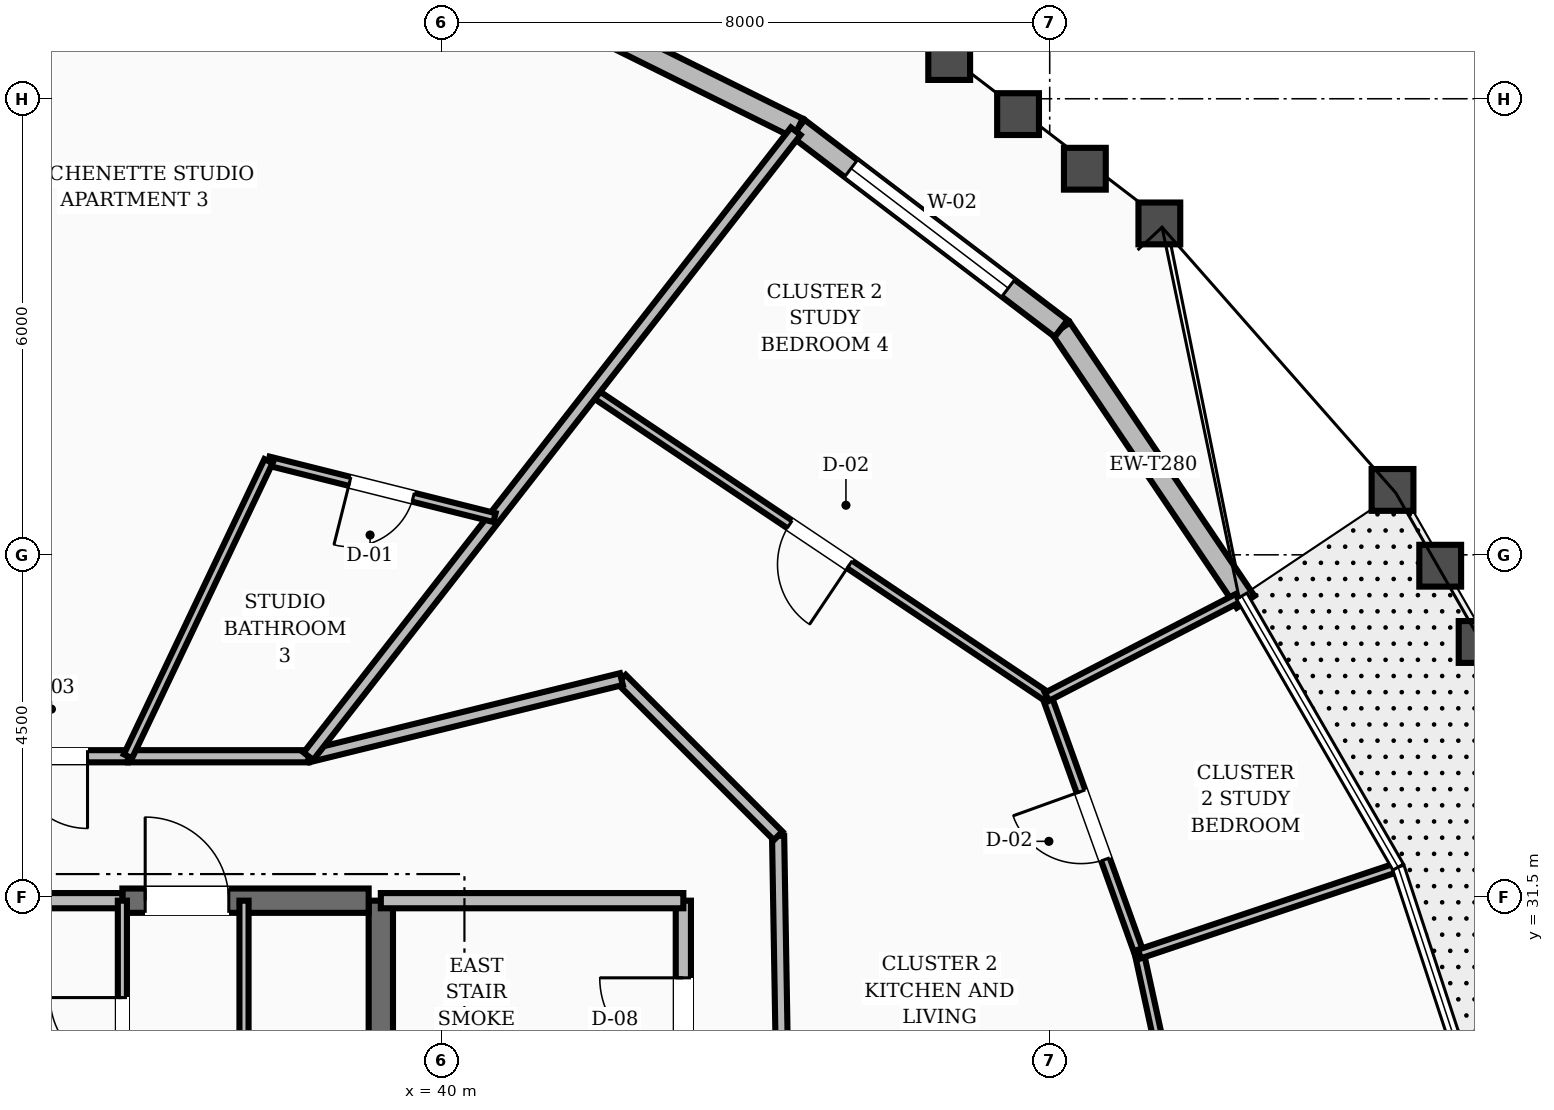
"""IFC4 building model, lengths in metres.
Left out: names, types, materials, properties, quantities, classifications, styles, units other than length and angle.
Written with IfcOpenShell. Run it as: python <this file> out.ifc"""

import sys

from ifc_helpers import new_model, si_unit, direction, frame, frame_2d, origin, place, context, subcontext, project, spatial, rectangle, extrude, element, fill, save


model = new_model("IFC4")
c1 = context("Model", 3, precision=1e-05, world=origin(), true_north=direction((0.0, 1.0)))
c2 = subcontext(c1, "Body", "Model", "MODEL_VIEW")
j1 = project(units=[si_unit("LENGTHUNIT", "METRE"), si_unit("PLANEANGLEUNIT", "RADIAN")], contexts=[c1])
p1 = place(None, origin())
s1 = spatial("IfcSite", under=j1, at=p1, CompositionType="ELEMENT")
p2 = place(p1, origin())
s2 = spatial("IfcBuilding", under=s1, at=p2, CompositionType="ELEMENT")
p3 = place(p2, frame((0.0, 0.0, 225.6)))
s3 = spatial("IfcBuildingStorey", under=s2, at=p3, CompositionType="ELEMENT", Elevation=225.6)
p4 = place(p3, frame((39.2, 25.15, 0.0), z_axis=(0.0, 0.0, 1.0), x_axis=(0.0, 1.0, 0.0)))
e1 = element("IfcWall", 1, at=p4, inside=s3, PredefinedType="SHEAR", context=c2, shape_type="SweptSolid", body=[
    extrude(rectangle(XDim=6.3, YDim=0.32, at=frame_2d((3.15, 0.0))), origin(), (0.0, 0.0, 1.0), 3.6),
])
p5 = place(p3, frame((35.8, 31.45, 0.0), z_axis=(0.0, 0.0, 1.0), x_axis=(1.0, 0.0, 0.0)))
e2 = element("IfcWall", 2, at=p5, inside=s3, PredefinedType="SHEAR", context=c2, shape_type="SweptSolid", body=[
    extrude(rectangle(XDim=3.24, YDim=0.32, at=frame_2d((1.62, 0.0))), origin(), (0.0, 0.0, 1.0), 3.6),
])
p6 = place(p5, frame((0.3, 0.0, 0.0)))
e3 = element("IfcOpeningElement", 3, at=p6, cuts=e2, PredefinedType="OPENING", context=c2, shape_type="SweptSolid", body=[
    extrude(rectangle(XDim=1.1, YDim=2.1, at=frame_2d((0.55, 1.05))), frame((0.0, 0.17, 0.0), z_axis=(0.0, -1.0, 0.0), x_axis=(1.0, 0.0, 0.0)), (0.0, 0.0, 1.0), 0.34),
])
p7 = place(p3, frame((50.577, 35.381, 0.0), z_axis=(0.0, 0.0, 1.0), x_axis=(-0.559158756737, 0.829060603795, 0.0)))
e4 = element("IfcWall", 4, at=p7, inside=s3, PredefinedType="STANDARD", context=c2, shape_type="SweptSolid", body=[
    extrude(rectangle(XDim=4.339, YDim=0.28, at=frame_2d((2.169, 0.0))), origin(), (0.0, 0.0, 1.0), 2.88),
])
p8 = place(p3, frame((48.151, 38.978, 0.0), z_axis=(0.0, 0.0, 1.0), x_axis=(-0.795722836513, 0.605660934394, 0.0)))
e5 = element("IfcWall", 5, at=p8, inside=s3, PredefinedType="STANDARD", context=c2, shape_type="SweptSolid", body=[
    extrude(rectangle(XDim=4.349, YDim=0.28, at=frame_2d((2.175, 0.0))), origin(), (0.0, 0.0, 1.0), 2.88),
])
p9 = place(p8, frame((0.875, 0.0, 0.8)))
e6 = element("IfcOpeningElement", 6, at=p9, cuts=e5, PredefinedType="OPENING", context=c2, shape_type="SweptSolid", body=[
    extrude(rectangle(XDim=2.6, YDim=1.65, at=frame_2d((1.3, 0.825))), frame((0.0, 0.15, 0.0), z_axis=(0.0, -1.0, 0.0), x_axis=(1.0, 0.0, 0.0)), (0.0, 0.0, 1.0), 0.3),
])
p10 = place(p3, frame((44.69, 41.613, 0.0), z_axis=(0.0, 0.0, 1.0), x_axis=(-0.89596177971, 0.44413116227, 0.0)))
e7 = element("IfcWall", 7, at=p10, inside=s3, PredefinedType="STANDARD", context=c2, shape_type="SweptSolid", body=[
    extrude(rectangle(XDim=4.407, YDim=0.28, at=frame_2d((2.204, 0.0))), origin(), (0.0, 0.0, 1.0), 2.88),
])
p11 = place(p3, frame((43.18, 28.32, 0.0), z_axis=(0.0, 0.0, 1.0), x_axis=(0.0, 1.0, 0.0)))
e8 = element("IfcWall", 8, at=p11, inside=s3, PredefinedType="SOLIDWALL", context=c2, shape_type="SweptSolid", body=[
    extrude(rectangle(XDim=3.13, YDim=0.2, at=frame_2d((1.565, 0.0))), origin(), (0.0, 0.0, 1.0), 2.87),
])
p12 = place(p11, frame((1.015, 0.0, 0.0)))
e9 = element("IfcOpeningElement", 9, at=p12, cuts=e8, PredefinedType="OPENING", context=c2, shape_type="SweptSolid", body=[
    extrude(rectangle(XDim=1.1, YDim=2.1, at=frame_2d((0.55, 1.05))), frame((0.0, 0.11, 0.0), z_axis=(0.0, -1.0, 0.0), x_axis=(1.0, 0.0, 0.0)), (0.0, 0.0, 1.0), 0.22),
])
p13 = place(p3, frame((39.2, 31.45, 0.0), z_axis=(0.0, 0.0, 1.0), x_axis=(1.0, 0.0, 0.0)))
e10 = element("IfcWall", 10, at=p13, inside=s3, PredefinedType="SOLIDWALL", context=c2, shape_type="SweptSolid", body=[
    extrude(rectangle(XDim=3.98, YDim=0.2, at=frame_2d((1.99, 0.0))), origin(), (0.0, 0.0, 1.0), 2.87),
])
p14 = place(p3, frame((28.2, 31.45, 0.0), z_axis=(0.0, 0.0, 1.0), x_axis=(1.0, 0.0, 0.0)))
e11 = element("IfcWall", 11, at=p14, inside=s3, PredefinedType="SOLIDWALL", context=c2, shape_type="SweptSolid", body=[
    extrude(rectangle(XDim=7.6, YDim=0.2, at=frame_2d((3.8, 0.0))), origin(), (0.0, 0.0, 1.0), 2.87),
])
p15 = place(p14, frame((1.0, 0.0, 0.0)))
e12 = element("IfcOpeningElement", 12, at=p15, cuts=e11, PredefinedType="OPENING", context=c2, shape_type="SweptSolid", body=[
    extrude(rectangle(XDim=0.95, YDim=2.1, at=frame_2d((0.475, 1.05))), frame((0.0, 0.11, 0.0), z_axis=(0.0, -1.0, 0.0), x_axis=(1.0, 0.0, 0.0)), (0.0, 0.0, 1.0), 0.22),
])
p16 = place(p3, frame((35.8, 27.95, 0.0), z_axis=(0.0, 0.0, 1.0), x_axis=(0.0, 1.0, 0.0)))
e13 = element("IfcWall", 13, at=p16, inside=s3, PredefinedType="PARTITIONING", context=c2, shape_type="SweptSolid", body=[
    extrude(rectangle(XDim=3.5, YDim=0.12, at=frame_2d((1.75, 0.0))), origin(), (0.0, 0.0, 1.0), 2.87),
])
p17 = place(p16, frame((1.275, 0.0, 0.0)))
e14 = element("IfcOpeningElement", 14, at=p17, cuts=e13, PredefinedType="OPENING", context=c2, shape_type="SweptSolid", body=[
    extrude(rectangle(XDim=0.95, YDim=2.1, at=frame_2d((0.475, 1.05))), frame((0.0, 0.07, 0.0), z_axis=(0.0, -1.0, 0.0), x_axis=(1.0, 0.0, 0.0)), (0.0, 0.0, 1.0), 0.14),
])
p18 = place(p3, frame((37.4, 25.25, 0.0), z_axis=(0.0, 0.0, 1.0), x_axis=(0.0, 1.0, 0.0)))
e15 = element("IfcWall", 15, at=p18, inside=s3, PredefinedType="PARTITIONING", context=c2, shape_type="SweptSolid", body=[
    extrude(rectangle(XDim=6.2, YDim=0.12, at=frame_2d((3.1, 0.0))), origin(), (0.0, 0.0, 1.0), 2.87),
])
p19 = place(p18, frame((2.625, 0.0, 0.0)))
e16 = element("IfcOpeningElement", 16, at=p19, cuts=e15, PredefinedType="OPENING", context=c2, shape_type="SweptSolid", body=[
    extrude(rectangle(XDim=0.95, YDim=2.1, at=frame_2d((0.475, 1.05))), frame((0.0, 0.07, 0.0), z_axis=(0.0, -1.0, 0.0), x_axis=(1.0, 0.0, 0.0)), (0.0, 0.0, 1.0), 0.14),
])
p20 = place(p3, frame((44.48, 29.169, 0.0), z_axis=(0.0, 0.0, 1.0), x_axis=(-0.016981035134, 0.999855811828, 0.0)))
e17 = element("IfcWall", 17, at=p20, inside=s3, PredefinedType="SOLIDWALL", context=c2, shape_type="SweptSolid", body=[
    extrude(rectangle(XDim=3.134, YDim=0.16, at=frame_2d((1.567, 0.0))), origin(), (0.0, 0.0, 1.0), 2.87),
])
p21 = place(p3, frame((44.427, 32.303, 0.0), z_axis=(0.0, 0.0, 1.0), x_axis=(-0.707106781187, 0.707106781187, 0.0)))
e18 = element("IfcWall", 18, at=p21, inside=s3, PredefinedType="SOLIDWALL", context=c2, shape_type="SweptSolid", body=[
    extrude(rectangle(XDim=2.916, YDim=0.16, at=frame_2d((1.458, 0.0))), origin(), (0.0, 0.0, 1.0), 2.87),
])
p22 = place(p3, frame((42.365, 34.365, 0.0), z_axis=(0.0, 0.0, 1.0), x_axis=(-0.970939799552, -0.239323850978, 0.0)))
e19 = element("IfcWall", 19, at=p22, inside=s3, PredefinedType="SOLIDWALL", context=c2, shape_type="SweptSolid", body=[
    extrude(rectangle(XDim=4.241, YDim=0.16, at=frame_2d((2.12, 0.0))), origin(), (0.0, 0.0, 1.0), 2.87),
])
p23 = place(p3, frame((38.248, 33.35, 0.0), z_axis=(0.0, 0.0, 1.0), x_axis=(-1.0, 0.0, 0.0)))
e20 = element("IfcWall", 20, at=p23, inside=s3, PredefinedType="SOLIDWALL", context=c2, shape_type="SweptSolid", body=[
    extrude(rectangle(XDim=2.375, YDim=0.16, at=frame_2d((1.188, 0.0))), origin(), (0.0, 0.0, 1.0), 2.87),
])
p24 = place(p3, frame((35.873, 33.35, 0.0), z_axis=(0.0, 0.0, 1.0), x_axis=(-1.0, 0.0, 0.0)))
e21 = element("IfcWall", 21, at=p24, inside=s3, PredefinedType="SOLIDWALL", context=c2, shape_type="SweptSolid", body=[
    extrude(rectangle(XDim=2.013, YDim=0.16, at=frame_2d((1.006, 0.0))), origin(), (0.0, 0.0, 1.0), 2.87),
])
p25 = place(p24, frame((0.531, 0.0, 0.0)))
e22 = element("IfcOpeningElement", 22, at=p25, cuts=e21, PredefinedType="OPENING", context=c2, shape_type="SweptSolid", body=[
    extrude(rectangle(XDim=0.95, YDim=2.1, at=frame_2d((0.475, 1.05))), frame((0.0, 0.09, 0.0), z_axis=(0.0, -1.0, 0.0), x_axis=(1.0, 0.0, 0.0)), (0.0, 0.0, 1.0), 0.18),
])
p26 = place(p3, frame((49.916, 27.376, 0.0), z_axis=(0.0, 0.0, 1.0), x_axis=(-0.213063946471, 0.977038256525, 0.0)))
e23 = element("IfcWall", 23, at=p26, inside=s3, PredefinedType="PARTITIONING", context=c2, shape_type="SweptSolid", body=[
    extrude(rectangle(XDim=3.451, YDim=0.12, at=frame_2d((1.726, 0.0))), origin(), (0.0, 0.0, 1.0), 2.87),
])
p27 = place(p26, frame((1.251, 0.0, 0.0)))
e24 = element("IfcOpeningElement", 24, at=p27, cuts=e23, PredefinedType="OPENING", context=c2, shape_type="SweptSolid", body=[
    extrude(rectangle(XDim=0.95, YDim=2.1, at=frame_2d((0.475, 1.05))), frame((0.0, 0.07, 0.0), z_axis=(0.0, -1.0, 0.0), x_axis=(1.0, 0.0, 0.0)), (0.0, 0.0, 1.0), 0.14),
])
p28 = place(p3, frame((49.181, 30.748, 0.0), z_axis=(0.0, 0.0, 1.0), x_axis=(-0.33827951378, 0.941045679314, 0.0)))
e25 = element("IfcWall", 25, at=p28, inside=s3, PredefinedType="PARTITIONING", context=c2, shape_type="SweptSolid", body=[
    extrude(rectangle(XDim=3.596, YDim=0.12, at=frame_2d((1.798, 0.0))), origin(), (0.0, 0.0, 1.0), 2.87),
])
p29 = place(p28, frame((1.323, 0.0, 0.0)))
e26 = element("IfcOpeningElement", 26, at=p29, cuts=e25, PredefinedType="OPENING", context=c2, shape_type="SweptSolid", body=[
    extrude(rectangle(XDim=0.95, YDim=2.1, at=frame_2d((0.475, 1.05))), frame((0.0, 0.07, 0.0), z_axis=(0.0, -1.0, 0.0), x_axis=(1.0, 0.0, 0.0)), (0.0, 0.0, 1.0), 0.14),
])
p30 = place(p3, frame((49.181, 30.748, 0.0), z_axis=(0.0, 0.0, 1.0), x_axis=(0.947929060238, 0.318481548534, 0.0)))
e27 = element("IfcWall", 27, at=p30, inside=s3, PredefinedType="PARTITIONING", context=c2, shape_type="SweptSolid", body=[
    extrude(rectangle(XDim=3.541, YDim=0.12, at=frame_2d((1.771, 0.0))), origin(), (0.0, 0.0, 1.0), 2.87),
])
p31 = place(p3, frame((47.964, 34.133, 0.0), z_axis=(0.0, 0.0, 1.0), x_axis=(-0.830591967255, 0.556881481046, 0.0)))
e28 = element("IfcWall", 28, at=p31, inside=s3, PredefinedType="PARTITIONING", context=c2, shape_type="SweptSolid", body=[
    extrude(rectangle(XDim=7.2, YDim=0.12, at=frame_2d((3.6, 0.0))), origin(), (0.0, 0.0, 1.0), 2.87),
])
p32 = place(p31, frame((3.125, 0.0, 0.0)))
e29 = element("IfcOpeningElement", 29, at=p32, cuts=e28, PredefinedType="OPENING", context=c2, shape_type="SweptSolid", body=[
    extrude(rectangle(XDim=0.95, YDim=2.1, at=frame_2d((0.475, 1.05))), frame((0.0, 0.07, 0.0), z_axis=(0.0, -1.0, 0.0), x_axis=(1.0, 0.0, 0.0)), (0.0, 0.0, 1.0), 0.14),
])
p33 = place(p3, frame((47.964, 34.133, 0.0), z_axis=(0.0, 0.0, 1.0), x_axis=(0.888279464534, 0.459303377831, 0.0)))
e30 = element("IfcWall", 30, at=p33, inside=s3, PredefinedType="PARTITIONING", context=c2, shape_type="SweptSolid", body=[
    extrude(rectangle(XDim=2.834, YDim=0.12, at=frame_2d((1.417, 0.0))), origin(), (0.0, 0.0, 1.0), 2.87),
])
p34 = place(p3, frame((38.248, 33.35, 0.0), z_axis=(0.0, 0.0, 1.0), x_axis=(0.614883592215, 0.788617884672, 0.0)))
e31 = element("IfcWall", 31, at=p34, inside=s3, PredefinedType="SOLIDWALL", context=c2, shape_type="SweptSolid", body=[
    extrude(rectangle(XDim=10.427, YDim=0.16, at=frame_2d((5.213, 0.0))), origin(), (0.0, 0.0, 1.0), 2.87),
])
p35 = place(p3, frame((40.696, 36.49, 0.0), z_axis=(0.0, 0.0, 1.0), x_axis=(-0.970090929749, 0.242741813496, 0.0)))
e32 = element("IfcWall", 32, at=p35, inside=s3, PredefinedType="PARTITIONING", context=c2, shape_type="SweptSolid", body=[
    extrude(rectangle(XDim=3.064, YDim=0.12, at=frame_2d((1.532, 0.0))), origin(), (0.0, 0.0, 1.0), 2.87),
])
p36 = place(p35, frame((1.102, 0.0, 0.0)))
e33 = element("IfcOpeningElement", 33, at=p36, cuts=e32, PredefinedType="OPENING", context=c2, shape_type="SweptSolid", body=[
    extrude(rectangle(XDim=0.86, YDim=2.1, at=frame_2d((0.43, 1.05))), frame((0.0, 0.07, 0.0), z_axis=(0.0, -1.0, 0.0), x_axis=(1.0, 0.0, 0.0)), (0.0, 0.0, 1.0), 0.14),
])
p37 = place(p3, frame((35.873, 33.35, 0.0), z_axis=(0.0, 0.0, 1.0), x_axis=(0.430037122425, 0.90281120581, 0.0)))
e34 = element("IfcWall", 34, at=p37, inside=s3, PredefinedType="PARTITIONING", context=c2, shape_type="SweptSolid", body=[
    extrude(rectangle(XDim=4.302, YDim=0.12, at=frame_2d((2.151, 0.0))), origin(), (0.0, 0.0, 1.0), 2.87),
])
p38 = place(p9, origin())
e35 = element("IfcWindow", 35, at=p38, inside=s3, PartitioningType="SINGLE_PANEL", PredefinedType="WINDOW", context=c2, shape_type="SweptSolid", body=[
    extrude(rectangle(XDim=2.6, YDim=1.65, at=frame_2d((1.3, 0.825))), frame((0.0, 0.03, 0.0), z_axis=(0.0, -1.0, 0.0), x_axis=(1.0, 0.0, 0.0)), (0.0, 0.0, 1.0), 0.06),
])
fill(e6, e35)
p39 = place(p12, origin())
e36 = element("IfcDoor", 36, at=p39, inside=s3, OperationType="SINGLE_SWING_RIGHT", PredefinedType="DOOR", context=c2, shape_type="SweptSolid", body=[
    extrude(rectangle(XDim=1.1, YDim=2.1, at=frame_2d((0.55, 1.05))), frame((0.0, 0.025, 0.0), z_axis=(0.0, -1.0, 0.0), x_axis=(1.0, 0.0, 0.0)), (0.0, 0.0, 1.0), 0.05),
])
fill(e9, e36)
p40 = place(p6, origin())
e37 = element("IfcDoor", 37, at=p40, inside=s3, OperationType="SINGLE_SWING_LEFT", PredefinedType="DOOR", context=c2, shape_type="SweptSolid", body=[
    extrude(rectangle(XDim=1.1, YDim=2.1, at=frame_2d((0.55, 1.05))), frame((0.0, 0.025, 0.0), z_axis=(0.0, -1.0, 0.0), x_axis=(1.0, 0.0, 0.0)), (0.0, 0.0, 1.0), 0.05),
])
fill(e3, e37)
p41 = place(p17, origin())
e38 = element("IfcDoor", 38, at=p41, inside=s3, OperationType="SINGLE_SWING_RIGHT", PredefinedType="DOOR", context=c2, shape_type="SweptSolid", body=[
    extrude(rectangle(XDim=0.95, YDim=2.1, at=frame_2d((0.475, 1.05))), frame((0.0, 0.025, 0.0), z_axis=(0.0, -1.0, 0.0), x_axis=(1.0, 0.0, 0.0)), (0.0, 0.0, 1.0), 0.05),
])
fill(e14, e38)
p42 = place(p29, origin())
e39 = element("IfcDoor", 39, at=p42, inside=s3, OperationType="SINGLE_SWING_RIGHT", PredefinedType="DOOR", context=c2, shape_type="SweptSolid", body=[
    extrude(rectangle(XDim=0.95, YDim=2.1, at=frame_2d((0.475, 1.05))), frame((0.0, 0.025, 0.0), z_axis=(0.0, -1.0, 0.0), x_axis=(1.0, 0.0, 0.0)), (0.0, 0.0, 1.0), 0.05),
])
fill(e26, e39)
p43 = place(p32, origin())
e40 = element("IfcDoor", 40, at=p43, inside=s3, OperationType="SINGLE_SWING_LEFT", PredefinedType="DOOR", context=c2, shape_type="SweptSolid", body=[
    extrude(rectangle(XDim=0.95, YDim=2.1, at=frame_2d((0.475, 1.05))), frame((0.0, 0.025, 0.0), z_axis=(0.0, -1.0, 0.0), x_axis=(1.0, 0.0, 0.0)), (0.0, 0.0, 1.0), 0.05),
])
fill(e29, e40)
p44 = place(p36, origin())
e41 = element("IfcDoor", 41, at=p44, inside=s3, OperationType="SINGLE_SWING_RIGHT", PredefinedType="DOOR", context=c2, shape_type="SweptSolid", body=[
    extrude(rectangle(XDim=0.86, YDim=2.1, at=frame_2d((0.43, 1.05))), frame((0.0, 0.025, 0.0), z_axis=(0.0, -1.0, 0.0), x_axis=(1.0, 0.0, 0.0)), (0.0, 0.0, 1.0), 0.05),
])
fill(e33, e41)
p45 = place(p25, origin())
e42 = element("IfcDoor", 42, at=p45, inside=s3, OperationType="SINGLE_SWING_LEFT", PredefinedType="DOOR", context=c2, shape_type="SweptSolid", body=[
    extrude(rectangle(XDim=0.95, YDim=2.1, at=frame_2d((0.475, 1.05))), frame((0.0, 0.025, 0.0), z_axis=(0.0, -1.0, 0.0), x_axis=(1.0, 0.0, 0.0)), (0.0, 0.0, 1.0), 0.05),
])
fill(e22, e42)
save(model, sys.argv[1])
